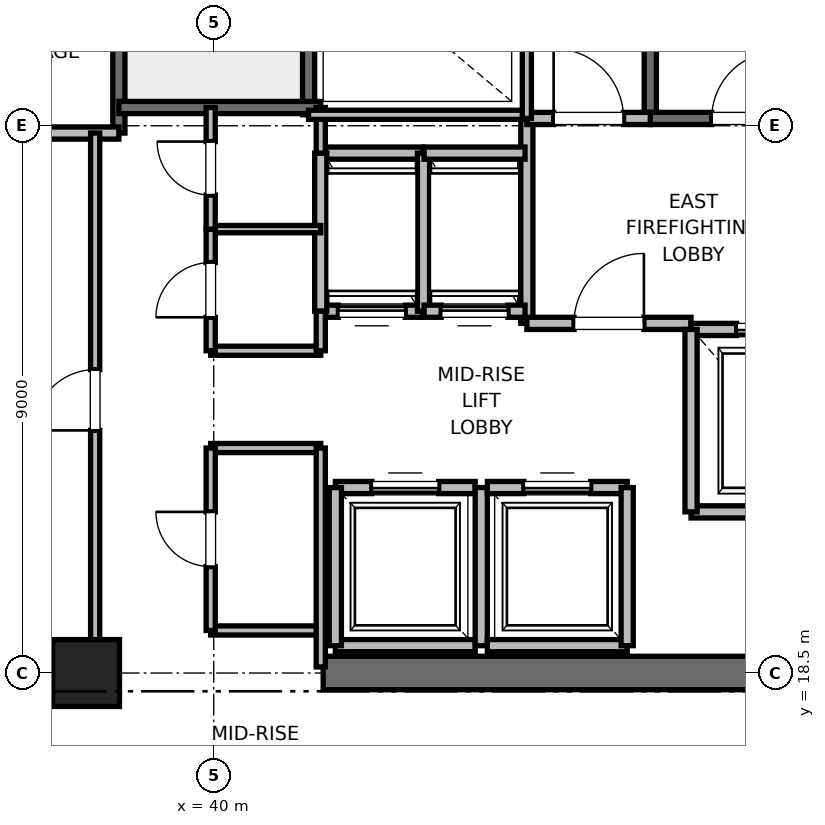
"""IFC4 building model, lengths in metres.
Left out: names, types, materials, properties, quantities, classifications, styles, units other than length and angle.
Written with IfcOpenShell. Run it as: python <this file> out.ifc"""

import sys

from ifc_helpers import new_model, si_unit, direction, frame, frame_2d, origin, origin_2d, place, context, subcontext, project, spatial, rectangle, extrude, element, fill, save


model = new_model("IFC4")
c1 = context("Model", 3, precision=1e-05, world=origin(), true_north=direction((0.0, 1.0)))
c2 = subcontext(c1, "Body", "Model", "MODEL_VIEW")
j1 = project(units=[si_unit("LENGTHUNIT", "METRE"), si_unit("PLANEANGLEUNIT", "RADIAN")], contexts=[c1])
p1 = place(None, origin())
s1 = spatial("IfcSite", under=j1, at=p1, CompositionType="ELEMENT")
p2 = place(p1, origin())
s2 = spatial("IfcBuilding", under=s1, at=p2, CompositionType="ELEMENT")
p3 = place(p2, frame((0.0, 0.0, 164.4)))
s3 = spatial("IfcBuildingStorey", under=s2, at=p3, CompositionType="ELEMENT", Elevation=164.4)
p4 = place(p3, frame((37.9, 18.5, 0.0), z_axis=(0.0, 0.0, 1.0), x_axis=(1.0, 0.0, 0.0)))
e1 = element("IfcColumn", 1, at=p4, inside=s3, PredefinedType="PILASTER", context=c2, shape_type="SweptSolid", body=[
    extrude(rectangle(XDim=1.1, YDim=1.1, at=origin_2d()), origin(), (0.0, 0.0, 1.0), 4.0),
])
for number, where, z_axis, x_axis in (
    (2, (29.0, 18.5, 0.0), (0.0, 0.0, 1.0), (1.0, 0.0, 0.0)),
    (3, (41.8, 18.5, 0.0), (0.0, 0.0, 1.0), (1.0, 0.0, 0.0)),
):
    element("IfcWall", number, at=place(p3, frame(where, z_axis=z_axis, x_axis=x_axis)), inside=s3, PredefinedType="SHEAR", context=c2, shape_type="SweptSolid", body=[
        extrude(rectangle(XDim=9.2, YDim=0.55, at=frame_2d((4.6, 0.0))), origin(), (0.0, 0.0, 1.0), 3.775),
    ])
p5 = place(p3, frame((47.18, 27.62, 0.0), z_axis=(0.0, 0.0, 1.0), x_axis=(0.0, 1.0, 0.0)))
e4 = element("IfcWall", 4, at=p5, inside=s3, PredefinedType="SOLIDWALL", context=c2, shape_type="SweptSolid", body=[
    extrude(rectangle(XDim=8.18, YDim=0.2, at=frame_2d((4.09, 0.0))), origin(), (0.0, 0.0, 1.0), 3.775),
])
p6 = place(p3, frame((47.18, 27.62, 0.0), z_axis=(0.0, 0.0, 1.0), x_axis=(1.0, 0.0, 0.0)))
e5 = element("IfcWall", 5, at=p6, inside=s3, PredefinedType="SOLIDWALL", context=c2, shape_type="SweptSolid", body=[
    extrude(rectangle(XDim=3.12, YDim=0.2, at=frame_2d((1.56, 0.0))), origin(), (0.0, 0.0, 1.0), 3.775),
])
p7 = place(p6, frame((1.01, 0.0, 0.0)))
e6 = element("IfcOpeningElement", 6, at=p7, cuts=e5, PredefinedType="OPENING", context=c2, shape_type="SweptSolid", body=[
    extrude(rectangle(XDim=1.1, YDim=2.15, at=frame_2d((0.55, 1.075))), frame((0.0, 0.1, 0.0), z_axis=(0.0, -1.0, 0.0), x_axis=(1.0, 0.0, 0.0)), (0.0, 0.0, 1.0), 0.2),
])
p8 = place(p3, frame((38.44, 27.38, 0.0), z_axis=(0.0, 0.0, 1.0), x_axis=(0.0, 1.0, 0.0)))
e7 = element("IfcWall", 7, at=p8, inside=s3, PredefinedType="SOLIDWALL", context=c2, shape_type="SweptSolid", body=[
    extrude(rectangle(XDim=8.87, YDim=0.2, at=frame_2d((4.435, 0.0))), origin(), (0.0, 0.0, 1.0), 3.775),
])
p9 = place(p3, frame((41.56, 27.68, 0.0), z_axis=(0.0, 0.0, 1.0), x_axis=(0.0, 1.0, 0.0)))
e8 = element("IfcWall", 8, at=p9, inside=s3, PredefinedType="SOLIDWALL", context=c2, shape_type="SweptSolid", body=[
    extrude(rectangle(XDim=8.57, YDim=0.2, at=frame_2d((4.285, 0.0))), origin(), (0.0, 0.0, 1.0), 3.775),
])
p10 = place(p3, frame((38.44, 27.8, 0.0), z_axis=(0.0, 0.0, 1.0), x_axis=(1.0, 0.0, 0.0)))
e9 = element("IfcWall", 9, at=p10, inside=s3, PredefinedType="SOLIDWALL", context=c2, shape_type="SweptSolid", body=[
    extrude(rectangle(XDim=3.32, YDim=0.2, at=frame_2d((1.66, 0.0))), origin(), (0.0, 0.0, 1.0), 3.775),
])
p11 = place(p3, frame((32.82, 27.38, 0.0), z_axis=(0.0, 0.0, 1.0), x_axis=(1.0, 0.0, 0.0)))
e10 = element("IfcWall", 10, at=p11, inside=s3, PredefinedType="PARTITIONING", context=c2, shape_type="SweptSolid", body=[
    extrude(rectangle(XDim=5.62, YDim=0.2, at=frame_2d((2.81, 0.0))), origin(), (0.0, 0.0, 1.0), 3.775),
])
p12 = place(p3, frame((45.15, 24.25, 0.0), z_axis=(0.0, 0.0, 1.0), x_axis=(0.0, 1.0, 0.0)))
e11 = element("IfcWall", 11, at=p12, inside=s3, PredefinedType="PARTITIONING", context=c2, shape_type="SweptSolid", body=[
    extrude(rectangle(XDim=3.37, YDim=0.2, at=frame_2d((1.685, 0.0))), origin(), (0.0, 0.0, 1.0), 3.775),
])
p13 = place(p3, frame((45.15, 24.25, 0.0), z_axis=(0.0, 0.0, 1.0), x_axis=(1.0, 0.0, 0.0)))
e12 = element("IfcWall", 12, at=p13, inside=s3, PredefinedType="PARTITIONING", context=c2, shape_type="SweptSolid", body=[
    extrude(rectangle(XDim=2.7, YDim=0.2, at=frame_2d((1.35, 0.0))), origin(), (0.0, 0.0, 1.0), 3.775),
])
p14 = place(p13, frame((0.775, 0.0, 0.0)))
e13 = element("IfcOpeningElement", 13, at=p14, cuts=e12, PredefinedType="OPENING", context=c2, shape_type="SweptSolid", body=[
    extrude(rectangle(XDim=1.15, YDim=2.2, at=frame_2d((0.575, 1.1))), frame((0.0, 0.1, 0.0), z_axis=(0.0, -1.0, 0.0), x_axis=(1.0, 0.0, 0.0)), (0.0, 0.0, 1.0), 0.2),
])
p15 = place(p3, frame((45.15, 27.62, 0.0), z_axis=(0.0, 0.0, 1.0), x_axis=(1.0, 0.0, 0.0)))
e14 = element("IfcWall", 14, at=p15, inside=s3, PredefinedType="PARTITIONING", context=c2, shape_type="SweptSolid", body=[
    extrude(rectangle(XDim=2.03, YDim=0.2, at=frame_2d((1.015, 0.0))), origin(), (0.0, 0.0, 1.0), 3.775),
])
p16 = place(p15, frame((0.44, 0.0, 0.0)))
e15 = element("IfcOpeningElement", 15, at=p16, cuts=e14, PredefinedType="OPENING", context=c2, shape_type="SweptSolid", body=[
    extrude(rectangle(XDim=1.15, YDim=2.2, at=frame_2d((0.575, 1.1))), frame((0.0, 0.1, 0.0), z_axis=(0.0, -1.0, 0.0), x_axis=(1.0, 0.0, 0.0)), (0.0, 0.0, 1.0), 0.2),
])
p17 = place(p3, frame((47.85, 21.15, 0.0), z_axis=(0.0, 0.0, 1.0), x_axis=(1.0, 0.0, 0.0)))
e16 = element("IfcWall", 16, at=p17, inside=s3, PredefinedType="SOLIDWALL", context=c2, shape_type="SweptSolid", body=[
    extrude(rectangle(XDim=2.6, YDim=0.2, at=frame_2d((1.3, 0.0))), origin(), (0.0, 0.0, 1.0), 3.775),
])
p18 = place(p3, frame((50.45, 24.15, 0.0), z_axis=(0.0, 0.0, 1.0), x_axis=(-1.0, 0.0, 0.0)))
e17 = element("IfcWall", 17, at=p18, inside=s3, PredefinedType="SOLIDWALL", context=c2, shape_type="SweptSolid", body=[
    extrude(rectangle(XDim=2.6, YDim=0.2, at=frame_2d((1.3, 0.0))), origin(), (0.0, 0.0, 1.0), 2.755),
])
p19 = place(p18, frame((0.75, 0.0, 0.0)))
e18 = element("IfcOpeningElement", 18, at=p19, cuts=e17, PredefinedType="OPENING", context=c2, shape_type="SweptSolid", body=[
    extrude(rectangle(XDim=1.1, YDim=2.2, at=frame_2d((0.55, 1.1))), frame((0.0, 0.1, 0.0), z_axis=(0.0, -1.0, 0.0), x_axis=(1.0, 0.0, 0.0)), (0.0, 0.0, 1.0), 0.2),
])
p20 = place(p3, frame((47.85, 24.15, 0.0), z_axis=(0.0, 0.0, 1.0), x_axis=(0.0, -1.0, 0.0)))
e19 = element("IfcWall", 19, at=p20, inside=s3, PredefinedType="SOLIDWALL", context=c2, shape_type="SweptSolid", body=[
    extrude(rectangle(XDim=3.0, YDim=0.2, at=frame_2d((1.5, 0.0))), origin(), (0.0, 0.0, 1.0), 3.775),
])
p21 = place(p3, frame((42.0, 18.95, 0.0), z_axis=(0.0, 0.0, 1.0), x_axis=(1.0, 0.0, 0.0)))
e20 = element("IfcWall", 20, at=p21, inside=s3, PredefinedType="SOLIDWALL", context=c2, shape_type="SweptSolid", body=[
    extrude(rectangle(XDim=2.3, YDim=0.2, at=frame_2d((1.15, 0.0))), origin(), (0.0, 0.0, 1.0), 2.755),
])
p22 = place(p3, frame((44.3, 21.55, 0.0), z_axis=(0.0, 0.0, 1.0), x_axis=(-1.0, 0.0, 0.0)))
e21 = element("IfcWall", 21, at=p22, inside=s3, PredefinedType="SOLIDWALL", context=c2, shape_type="SweptSolid", body=[
    extrude(rectangle(XDim=2.3, YDim=0.2, at=frame_2d((1.15, 0.0))), origin(), (0.0, 0.0, 1.0), 3.775),
])
p23 = place(p22, frame((0.6, 0.0, 0.0)))
e22 = element("IfcOpeningElement", 22, at=p23, cuts=e21, PredefinedType="OPENING", context=c2, shape_type="SweptSolid", body=[
    extrude(rectangle(XDim=1.1, YDim=2.2, at=frame_2d((0.55, 1.1))), frame((0.0, 0.1, 0.0), z_axis=(0.0, -1.0, 0.0), x_axis=(1.0, 0.0, 0.0)), (0.0, 0.0, 1.0), 0.2),
])
p24 = place(p3, frame((42.0, 21.55, 0.0), z_axis=(0.0, 0.0, 1.0), x_axis=(0.0, -1.0, 0.0)))
e23 = element("IfcWall", 23, at=p24, inside=s3, PredefinedType="SOLIDWALL", context=c2, shape_type="SweptSolid", body=[
    extrude(rectangle(XDim=2.6, YDim=0.2, at=frame_2d((1.3, 0.0))), origin(), (0.0, 0.0, 1.0), 2.755),
])
p25 = place(p3, frame((44.4, 18.95, 0.0), z_axis=(0.0, 0.0, 1.0), x_axis=(0.0, 1.0, 0.0)))
e24 = element("IfcWall", 24, at=p25, inside=s3, PredefinedType="SOLIDWALL", context=c2, shape_type="SweptSolid", body=[
    extrude(rectangle(XDim=2.6, YDim=0.2, at=frame_2d((1.3, 0.0))), origin(), (0.0, 0.0, 1.0), 3.775),
])
p26 = place(p3, frame((44.5, 18.95, 0.0), z_axis=(0.0, 0.0, 1.0), x_axis=(1.0, 0.0, 0.0)))
e25 = element("IfcWall", 25, at=p26, inside=s3, PredefinedType="SOLIDWALL", context=c2, shape_type="SweptSolid", body=[
    extrude(rectangle(XDim=2.3, YDim=0.2, at=frame_2d((1.15, 0.0))), origin(), (0.0, 0.0, 1.0), 3.775),
])
p27 = place(p3, frame((46.8, 21.55, 0.0), z_axis=(0.0, 0.0, 1.0), x_axis=(-1.0, 0.0, 0.0)))
e26 = element("IfcWall", 26, at=p27, inside=s3, PredefinedType="SOLIDWALL", context=c2, shape_type="SweptSolid", body=[
    extrude(rectangle(XDim=2.3, YDim=0.2, at=frame_2d((1.15, 0.0))), origin(), (0.0, 0.0, 1.0), 3.775),
])
p28 = place(p27, frame((0.6, 0.0, 0.0)))
e27 = element("IfcOpeningElement", 27, at=p28, cuts=e26, PredefinedType="OPENING", context=c2, shape_type="SweptSolid", body=[
    extrude(rectangle(XDim=1.1, YDim=2.2, at=frame_2d((0.55, 1.1))), frame((0.0, 0.1, 0.0), z_axis=(0.0, -1.0, 0.0), x_axis=(1.0, 0.0, 0.0)), (0.0, 0.0, 1.0), 0.2),
])
p29 = place(p3, frame((46.8, 18.95, 0.0), z_axis=(0.0, 0.0, 1.0), x_axis=(0.0, 1.0, 0.0)))
e28 = element("IfcWall", 28, at=p29, inside=s3, PredefinedType="SOLIDWALL", context=c2, shape_type="SweptSolid", body=[
    extrude(rectangle(XDim=2.6, YDim=0.2, at=frame_2d((1.3, 0.0))), origin(), (0.0, 0.0, 1.0), 3.775),
])
p30 = place(p3, frame((41.76, 24.45, 0.0), z_axis=(0.0, 0.0, 1.0), x_axis=(1.0, 0.0, 0.0)))
e29 = element("IfcWall", 29, at=p30, inside=s3, PredefinedType="SOLIDWALL", context=c2, shape_type="SweptSolid", body=[
    extrude(rectangle(XDim=1.68, YDim=0.2, at=frame_2d((0.84, 0.0))), origin(), (0.0, 0.0, 1.0), 3.775),
])
p31 = place(p30, frame((0.29, 0.0, 0.0)))
e30 = element("IfcOpeningElement", 30, at=p31, cuts=e29, PredefinedType="OPENING", context=c2, shape_type="SweptSolid", body=[
    extrude(rectangle(XDim=1.1, YDim=2.2, at=frame_2d((0.55, 1.1))), frame((0.0, 0.1, 0.0), z_axis=(0.0, -1.0, 0.0), x_axis=(1.0, 0.0, 0.0)), (0.0, 0.0, 1.0), 0.2),
])
p32 = place(p3, frame((43.44, 27.05, 0.0), z_axis=(0.0, 0.0, 1.0), x_axis=(-1.0, 0.0, 0.0)))
e31 = element("IfcWall", 31, at=p32, inside=s3, PredefinedType="SOLIDWALL", context=c2, shape_type="SweptSolid", body=[
    extrude(rectangle(XDim=1.68, YDim=0.2, at=frame_2d((0.84, 0.0))), origin(), (0.0, 0.0, 1.0), 3.775),
])
for number, where, z_axis, x_axis in (
    (32, (41.76, 27.05, 0.0), (0.0, 0.0, 1.0), (0.0, -1.0, 0.0)),
    (33, (43.45, 24.45, 0.0), (0.0, 0.0, 1.0), (0.0, 1.0, 0.0)),
):
    element("IfcWall", number, at=place(p3, frame(where, z_axis=z_axis, x_axis=x_axis)), inside=s3, PredefinedType="SOLIDWALL", context=c2, shape_type="SweptSolid", body=[
        extrude(rectangle(XDim=2.6, YDim=0.2, at=frame_2d((1.3, 0.0))), origin(), (0.0, 0.0, 1.0), 3.775),
    ])
p33 = place(p3, frame((43.46, 24.45, 0.0), z_axis=(0.0, 0.0, 1.0), x_axis=(1.0, 0.0, 0.0)))
e34 = element("IfcWall", 34, at=p33, inside=s3, PredefinedType="SOLIDWALL", context=c2, shape_type="SweptSolid", body=[
    extrude(rectangle(XDim=1.66, YDim=0.2, at=frame_2d((0.83, 0.0))), origin(), (0.0, 0.0, 1.0), 3.775),
])
p34 = place(p33, frame((0.28, 0.0, 0.0)))
e35 = element("IfcOpeningElement", 35, at=p34, cuts=e34, PredefinedType="OPENING", context=c2, shape_type="SweptSolid", body=[
    extrude(rectangle(XDim=1.1, YDim=2.2, at=frame_2d((0.55, 1.1))), frame((0.0, 0.1, 0.0), z_axis=(0.0, -1.0, 0.0), x_axis=(1.0, 0.0, 0.0)), (0.0, 0.0, 1.0), 0.2),
])
p35 = place(p3, frame((45.12, 27.05, 0.0), z_axis=(0.0, 0.0, 1.0), x_axis=(-1.0, 0.0, 0.0)))
e36 = element("IfcWall", 36, at=p35, inside=s3, PredefinedType="SOLIDWALL", context=c2, shape_type="SweptSolid", body=[
    extrude(rectangle(XDim=1.66, YDim=0.2, at=frame_2d((0.83, 0.0))), origin(), (0.0, 0.0, 1.0), 3.775),
])
for number, where, z_axis, x_axis in (
    (37, (39.95, 19.2, 0.0), (0.0, 0.0, 1.0), (1.0, 0.0, 0.0)),
    (38, (39.95, 22.2, 0.0), (0.0, 0.0, 1.0), (1.0, 0.0, 0.0)),
    (39, (39.95, 23.8, 0.0), (0.0, 0.0, 1.0), (1.0, 0.0, 0.0)),
):
    element("IfcWall", number, at=place(p3, frame(where, z_axis=z_axis, x_axis=x_axis)), inside=s3, PredefinedType="PARTITIONING", context=c2, shape_type="SweptSolid", body=[
        extrude(rectangle(XDim=1.81, YDim=0.15, at=frame_2d((0.905, 0.0))), origin(), (0.0, 0.0, 1.0), 2.85),
    ])
p36 = place(p3, frame((39.95, 25.8, 0.0), z_axis=(0.0, 0.0, 1.0), x_axis=(1.0, 0.0, 0.0)))
e40 = element("IfcWall", 40, at=p36, inside=s3, PredefinedType="PARTITIONING", context=c2, shape_type="SweptSolid", body=[
    extrude(rectangle(XDim=1.81, YDim=0.12, at=frame_2d((0.905, 0.0))), origin(), (0.0, 0.0, 1.0), 2.85),
])
p37 = place(p3, frame((41.76, 18.6, 0.0), z_axis=(0.0, 0.0, 1.0), x_axis=(0.0, 1.0, 0.0)))
e41 = element("IfcWall", 41, at=p37, inside=s3, PredefinedType="PARTITIONING", context=c2, shape_type="SweptSolid", body=[
    extrude(rectangle(XDim=3.6, YDim=0.15, at=frame_2d((1.8, 0.0))), origin(), (0.0, 0.0, 1.0), 2.755),
])
p38 = place(p3, frame((41.76, 23.8, 0.0), z_axis=(0.0, 0.0, 1.0), x_axis=(0.0, 1.0, 0.0)))
e42 = element("IfcWall", 42, at=p38, inside=s3, PredefinedType="PARTITIONING", context=c2, shape_type="SweptSolid", body=[
    extrude(rectangle(XDim=0.65, YDim=0.15, at=frame_2d((0.325, 0.0))), origin(), (0.0, 0.0, 1.0), 2.85),
])
p39 = place(p3, frame((41.76, 27.05, 0.0), z_axis=(0.0, 0.0, 1.0), x_axis=(0.0, 1.0, 0.0)))
e43 = element("IfcWall", 43, at=p39, inside=s3, PredefinedType="PARTITIONING", context=c2, shape_type="SweptSolid", body=[
    extrude(rectangle(XDim=0.75, YDim=0.15, at=frame_2d((0.375, 0.0))), origin(), (0.0, 0.0, 1.0), 2.85),
])
p40 = place(p3, frame((39.95, 19.2, 0.0), z_axis=(0.0, 0.0, 1.0), x_axis=(0.0, 1.0, 0.0)))
e44 = element("IfcWall", 44, at=p40, inside=s3, PredefinedType="PARTITIONING", context=c2, shape_type="SweptSolid", body=[
    extrude(rectangle(XDim=3.0, YDim=0.15, at=frame_2d((1.5, 0.0))), origin(), (0.0, 0.0, 1.0), 2.85),
])
p41 = place(p40, frame((1.05, 0.0, 0.0)))
e45 = element("IfcOpeningElement", 45, at=p41, cuts=e44, PredefinedType="OPENING", context=c2, shape_type="SweptSolid", body=[
    extrude(rectangle(XDim=0.9, YDim=2.1, at=frame_2d((0.45, 1.05))), frame((0.0, 0.075, 0.0), z_axis=(0.0, -1.0, 0.0), x_axis=(1.0, 0.0, 0.0)), (0.0, 0.0, 1.0), 0.15),
])
p42 = place(p3, frame((39.95, 23.8, 0.0), z_axis=(0.0, 0.0, 1.0), x_axis=(0.0, 1.0, 0.0)))
e46 = element("IfcWall", 46, at=p42, inside=s3, PredefinedType="PARTITIONING", context=c2, shape_type="SweptSolid", body=[
    extrude(rectangle(XDim=2.0, YDim=0.15, at=frame_2d((1.0, 0.0))), origin(), (0.0, 0.0, 1.0), 2.85),
])
p43 = place(p42, frame((0.55, 0.0, 0.0)))
e47 = element("IfcOpeningElement", 47, at=p43, cuts=e46, PredefinedType="OPENING", context=c2, shape_type="SweptSolid", body=[
    extrude(rectangle(XDim=0.9, YDim=2.1, at=frame_2d((0.45, 1.05))), frame((0.0, 0.075, 0.0), z_axis=(0.0, -1.0, 0.0), x_axis=(1.0, 0.0, 0.0)), (0.0, 0.0, 1.0), 0.15),
])
p44 = place(p3, frame((39.95, 25.8, 0.0), z_axis=(0.0, 0.0, 1.0), x_axis=(0.0, 1.0, 0.0)))
e48 = element("IfcWall", 48, at=p44, inside=s3, PredefinedType="PARTITIONING", context=c2, shape_type="SweptSolid", body=[
    extrude(rectangle(XDim=2.0, YDim=0.15, at=frame_2d((1.0, 0.0))), origin(), (0.0, 0.0, 1.0), 2.85),
])
p45 = place(p44, frame((0.56, 0.0, 0.0)))
e49 = element("IfcOpeningElement", 49, at=p45, cuts=e48, PredefinedType="OPENING", context=c2, shape_type="SweptSolid", body=[
    extrude(rectangle(XDim=0.88, YDim=2.1, at=frame_2d((0.44, 1.05))), frame((0.0, 0.075, 0.0), z_axis=(0.0, -1.0, 0.0), x_axis=(1.0, 0.0, 0.0)), (0.0, 0.0, 1.0), 0.15),
])
p46 = place(p3, frame((38.05, 18.6, 0.0), z_axis=(0.0, 0.0, 1.0), x_axis=(0.0, 1.0, 0.0)))
e50 = element("IfcWall", 50, at=p46, inside=s3, PredefinedType="PARTITIONING", context=c2, shape_type="SweptSolid", body=[
    extrude(rectangle(XDim=8.78, YDim=0.15, at=frame_2d((4.39, 0.0))), origin(), (0.0, 0.0, 1.0), 2.755),
])
p47 = place(p46, frame((3.89, 0.0, 0.0)))
e51 = element("IfcOpeningElement", 51, at=p47, cuts=e50, PredefinedType="OPENING", context=c2, shape_type="SweptSolid", body=[
    extrude(rectangle(XDim=1.0, YDim=2.15, at=frame_2d((0.5, 1.075))), frame((0.0, 0.075, 0.0), z_axis=(0.0, -1.0, 0.0), x_axis=(1.0, 0.0, 0.0)), (0.0, 0.0, 1.0), 0.15),
])
p48 = place(p3, frame((41.56, 27.68, 0.0), z_axis=(0.0, 0.0, 1.0), x_axis=(1.0, 0.0, 0.0)))
e52 = element("IfcWall", 52, at=p48, inside=s3, PredefinedType="PARTITIONING", context=c2, shape_type="SweptSolid", body=[
    extrude(rectangle(XDim=3.59, YDim=0.15, at=frame_2d((1.795, 0.0))), origin(), (0.0, 0.0, 1.0), 2.85),
])
p49 = place(p3, frame((45.15, 27.62, 0.0), z_axis=(0.0, 0.0, 1.0), x_axis=(0.0, 1.0, 0.0)))
e53 = element("IfcWall", 53, at=p49, inside=s3, PredefinedType="PARTITIONING", context=c2, shape_type="SweptSolid", body=[
    extrude(rectangle(XDim=3.1, YDim=0.15, at=frame_2d((1.55, 0.0))), origin(), (0.0, 0.0, 1.0), 2.85),
])
p50 = place(p7, origin())
e54 = element("IfcDoor", 54, at=p50, inside=s3, OperationType="SINGLE_SWING_RIGHT", PredefinedType="DOOR", context=c2, shape_type="SweptSolid", body=[
    extrude(rectangle(XDim=1.1, YDim=2.15, at=frame_2d((0.55, 1.075))), frame((0.0, 0.025, 0.0), z_axis=(0.0, -1.0, 0.0), x_axis=(1.0, 0.0, 0.0)), (0.0, 0.0, 1.0), 0.05),
])
fill(e6, e54)
p51 = place(p14, origin())
e55 = element("IfcDoor", 55, at=p51, inside=s3, OperationType="SINGLE_SWING_RIGHT", PredefinedType="DOOR", context=c2, shape_type="SweptSolid", body=[
    extrude(rectangle(XDim=1.15, YDim=2.2, at=frame_2d((0.575, 1.1))), frame((0.0, 0.025, 0.0), z_axis=(0.0, -1.0, 0.0), x_axis=(1.0, 0.0, 0.0)), (0.0, 0.0, 1.0), 0.05),
])
fill(e13, e55)
p52 = place(p16, origin())
e56 = element("IfcDoor", 56, at=p52, inside=s3, OperationType="SINGLE_SWING_LEFT", PredefinedType="DOOR", context=c2, shape_type="SweptSolid", body=[
    extrude(rectangle(XDim=1.15, YDim=2.2, at=frame_2d((0.575, 1.1))), frame((0.0, 0.025, 0.0), z_axis=(0.0, -1.0, 0.0), x_axis=(1.0, 0.0, 0.0)), (0.0, 0.0, 1.0), 0.05),
])
fill(e15, e56)
p53 = place(p19, origin())
e57 = element("IfcDoor", 57, at=p53, inside=s3, OperationType="SLIDING_TO_RIGHT", PredefinedType="DOOR", context=c2, shape_type="SweptSolid", body=[
    extrude(rectangle(XDim=1.1, YDim=2.2, at=frame_2d((0.55, 1.1))), frame((0.0, 0.025, 0.0), z_axis=(0.0, -1.0, 0.0), x_axis=(1.0, 0.0, 0.0)), (0.0, 0.0, 1.0), 0.05),
])
fill(e18, e57)
p54 = place(p23, origin())
e58 = element("IfcDoor", 58, at=p54, inside=s3, OperationType="SLIDING_TO_RIGHT", PredefinedType="DOOR", context=c2, shape_type="SweptSolid", body=[
    extrude(rectangle(XDim=1.1, YDim=2.2, at=frame_2d((0.55, 1.1))), frame((0.0, 0.025, 0.0), z_axis=(0.0, -1.0, 0.0), x_axis=(1.0, 0.0, 0.0)), (0.0, 0.0, 1.0), 0.05),
])
fill(e22, e58)
p55 = place(p28, origin())
e59 = element("IfcDoor", 59, at=p55, inside=s3, OperationType="SLIDING_TO_RIGHT", PredefinedType="DOOR", context=c2, shape_type="SweptSolid", body=[
    extrude(rectangle(XDim=1.1, YDim=2.2, at=frame_2d((0.55, 1.1))), frame((0.0, 0.025, 0.0), z_axis=(0.0, -1.0, 0.0), x_axis=(1.0, 0.0, 0.0)), (0.0, 0.0, 1.0), 0.05),
])
fill(e27, e59)
p56 = place(p31, origin())
e60 = element("IfcDoor", 60, at=p56, inside=s3, OperationType="SLIDING_TO_RIGHT", PredefinedType="DOOR", context=c2, shape_type="SweptSolid", body=[
    extrude(rectangle(XDim=1.1, YDim=2.2, at=frame_2d((0.55, 1.1))), frame((0.0, 0.025, 0.0), z_axis=(0.0, -1.0, 0.0), x_axis=(1.0, 0.0, 0.0)), (0.0, 0.0, 1.0), 0.05),
])
fill(e30, e60)
p57 = place(p34, origin())
e61 = element("IfcDoor", 61, at=p57, inside=s3, OperationType="SLIDING_TO_RIGHT", PredefinedType="DOOR", context=c2, shape_type="SweptSolid", body=[
    extrude(rectangle(XDim=1.1, YDim=2.2, at=frame_2d((0.55, 1.1))), frame((0.0, 0.025, 0.0), z_axis=(0.0, -1.0, 0.0), x_axis=(1.0, 0.0, 0.0)), (0.0, 0.0, 1.0), 0.05),
])
fill(e35, e61)
p58 = place(p41, origin())
e62 = element("IfcDoor", 62, at=p58, inside=s3, OperationType="SINGLE_SWING_RIGHT", PredefinedType="DOOR", context=c2, shape_type="SweptSolid", body=[
    extrude(rectangle(XDim=0.9, YDim=2.1, at=frame_2d((0.45, 1.05))), frame((0.0, 0.025, 0.0), z_axis=(0.0, -1.0, 0.0), x_axis=(1.0, 0.0, 0.0)), (0.0, 0.0, 1.0), 0.05),
])
fill(e45, e62)
p59 = place(p43, origin())
e63 = element("IfcDoor", 63, at=p59, inside=s3, OperationType="SINGLE_SWING_LEFT", PredefinedType="DOOR", context=c2, shape_type="SweptSolid", body=[
    extrude(rectangle(XDim=0.9, YDim=2.1, at=frame_2d((0.45, 1.05))), frame((0.0, 0.025, 0.0), z_axis=(0.0, -1.0, 0.0), x_axis=(1.0, 0.0, 0.0)), (0.0, 0.0, 1.0), 0.05),
])
fill(e47, e63)
p60 = place(p45, origin())
e64 = element("IfcDoor", 64, at=p60, inside=s3, OperationType="SINGLE_SWING_RIGHT", PredefinedType="DOOR", context=c2, shape_type="SweptSolid", body=[
    extrude(rectangle(XDim=0.88, YDim=2.1, at=frame_2d((0.44, 1.05))), frame((0.0, 0.025, 0.0), z_axis=(0.0, -1.0, 0.0), x_axis=(1.0, 0.0, 0.0)), (0.0, 0.0, 1.0), 0.05),
])
fill(e49, e64)
p61 = place(p47, origin())
e65 = element("IfcDoor", 65, at=p61, inside=s3, OperationType="SINGLE_SWING_LEFT", PredefinedType="DOOR", context=c2, shape_type="SweptSolid", body=[
    extrude(rectangle(XDim=1.0, YDim=2.15, at=frame_2d((0.5, 1.075))), frame((0.0, 0.025, 0.0), z_axis=(0.0, -1.0, 0.0), x_axis=(1.0, 0.0, 0.0)), (0.0, 0.0, 1.0), 0.05),
])
fill(e51, e65)
save(model, sys.argv[1])
